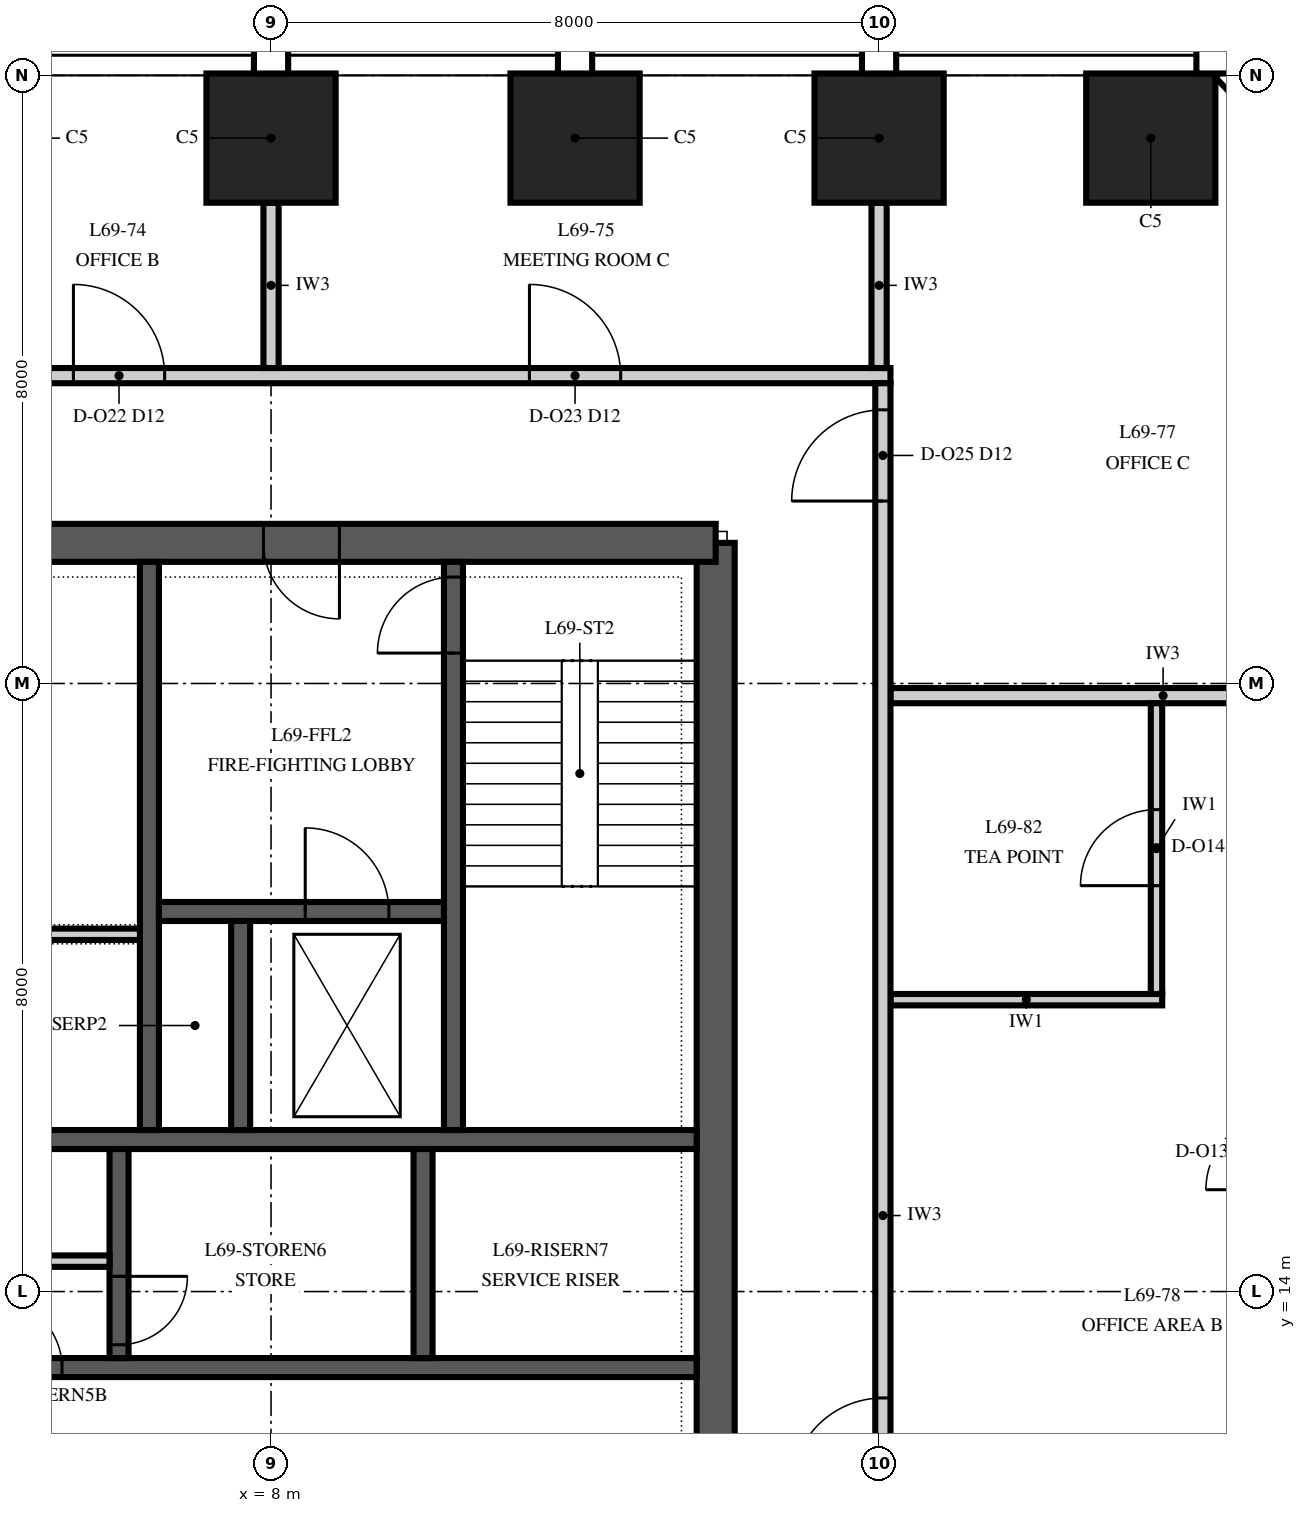
"""IFC4 building model, lengths in metres.
Left out: names, types, materials, properties, quantities, classifications, styles, units other than length and angle.
Written with IfcOpenShell. Run it as: python <this file> out.ifc"""

import sys

from ifc_helpers import new_model, si_unit, direction, frame, frame_2d, origin, origin_2d, place, context, subcontext, project, spatial, polyline, rectangle, outline, extrude, element, fill, save


model = new_model("IFC4")
c1 = context("Model", 3, precision=1e-05, world=origin(), true_north=direction((0.0, 1.0)))
c2 = subcontext(c1, "Body", "Model", "MODEL_VIEW")
j1 = project(units=[si_unit("LENGTHUNIT", "METRE"), si_unit("PLANEANGLEUNIT", "RADIAN")], contexts=[c1])
p1 = place(None, origin())
s1 = spatial("IfcSite", under=j1, at=p1, CompositionType="ELEMENT")
p2 = place(p1, origin())
s2 = spatial("IfcBuilding", under=s1, at=p2, CompositionType="ELEMENT")
p3 = place(p2, frame((0.0, 0.0, 296.0)))
s3 = spatial("IfcBuildingStorey", under=s2, at=p3, CompositionType="ELEMENT", Elevation=296.0)
for number, where, z_axis, x_axis in (
    (1, (19.575, 29.175, 0.0), (0.0, 0.0, 1.0), (-1.0, 0.0, 0.0)),
    (2, (16.0, 29.175, 0.0), (0.0, 0.0, 1.0), (-1.0, 0.0, 0.0)),
    (3, (12.0, 29.175, 0.0), (0.0, 0.0, 1.0), (-1.0, 0.0, 0.0)),
    (4, (8.0, 29.175, 0.0), (0.0, 0.0, 1.0), (-1.0, 0.0, 0.0)),
):
    element("IfcColumn", number, at=place(p3, frame(where, z_axis=z_axis, x_axis=x_axis)), inside=s3, PredefinedType="COLUMN", context=c2, shape_type="SweptSolid", body=[
        extrude(rectangle(XDim=1.7, YDim=1.7, at=origin_2d()), origin(), (0.0, 0.0, 1.0), 4.0),
    ])
p4 = place(p3, frame((13.85, 6.15, 0.0), z_axis=(0.0, 0.0, 1.0), x_axis=(0.0, 1.0, 0.0)))
e5 = element("IfcWall", 5, at=p4, inside=s3, PredefinedType="SHEAR", context=c2, shape_type="SweptSolid", body=[
    extrude(outline(polyline([(0.0, -0.25), (17.7, -0.25), (17.7, 0.0), (17.45, 0.0), (17.45, 0.25), (0.25, 0.25), (0.25, 0.0), (0.0, 0.0), (0.0, -0.25)])), origin(), (0.0, 0.0, 1.0), 4.0),
])
p5 = place(p4, frame((4.15, 0.0, 0.0)))
e6 = element("IfcOpeningElement", 6, at=p5, cuts=e5, PredefinedType="OPENING", context=c2, shape_type="SweptSolid", body=[
    extrude(rectangle(XDim=1.8, YDim=2.4, at=frame_2d((0.9, 1.2))), frame((0.0, 0.265, 0.0), z_axis=(0.0, -1.0, 0.0), x_axis=(1.0, 0.0, 0.0)), (0.0, 0.0, 1.0), 0.53),
])
p6 = place(p3, frame((13.85, 23.85, 0.0), z_axis=(0.0, 0.0, 1.0), x_axis=(-1.0, 0.0, 0.0)))
e7 = element("IfcWall", 7, at=p6, inside=s3, PredefinedType="SHEAR", context=c2, shape_type="SweptSolid", body=[
    extrude(rectangle(XDim=27.7, YDim=0.5, at=frame_2d((13.85, 0.0))), origin(), (0.0, 0.0, 1.0), 4.0),
])
p7 = place(p6, frame((21.75, 0.0, 0.0)))
e8 = element("IfcOpeningElement", 8, at=p7, cuts=e7, PredefinedType="OPENING", context=c2, shape_type="SweptSolid", body=[
    extrude(rectangle(XDim=1.0, YDim=2.1, at=frame_2d((0.5, 1.05))), frame((0.0, 0.265, 0.0), z_axis=(0.0, -1.0, 0.0), x_axis=(1.0, 0.0, 0.0)), (0.0, 0.0, 1.0), 0.53),
])
p8 = place(p6, frame((4.95, 0.0, 0.0)))
e9 = element("IfcOpeningElement", 9, at=p8, cuts=e7, PredefinedType="OPENING", context=c2, shape_type="SweptSolid", body=[
    extrude(rectangle(XDim=1.0, YDim=2.1, at=frame_2d((0.5, 1.05))), frame((0.0, 0.265, 0.0), z_axis=(0.0, -1.0, 0.0), x_axis=(1.0, 0.0, 0.0)), (0.0, 0.0, 1.0), 0.53),
])
p9 = place(p6, frame((17.35, 0.0, 0.0)))
e10 = element("IfcOpeningElement", 10, at=p9, cuts=e7, PredefinedType="OPENING", context=c2, shape_type="SweptSolid", body=[
    extrude(rectangle(XDim=1.0, YDim=2.1, at=frame_2d((0.5, 1.05))), frame((0.0, 0.265, 0.0), z_axis=(0.0, -1.0, 0.0), x_axis=(1.0, 0.0, 0.0)), (0.0, 0.0, 1.0), 0.53),
])
p10 = place(p6, frame((13.35, 0.0, 0.0)))
e11 = element("IfcOpeningElement", 11, at=p10, cuts=e7, PredefinedType="OPENING", context=c2, shape_type="SweptSolid", body=[
    extrude(rectangle(XDim=1.0, YDim=2.1, at=frame_2d((0.5, 1.05))), frame((0.0, 0.265, 0.0), z_axis=(0.0, -1.0, 0.0), x_axis=(1.0, 0.0, 0.0)), (0.0, 0.0, 1.0), 0.53),
])
p11 = place(p6, frame((9.35, 0.0, 0.0)))
e12 = element("IfcOpeningElement", 12, at=p11, cuts=e7, PredefinedType="OPENING", context=c2, shape_type="SweptSolid", body=[
    extrude(rectangle(XDim=1.0, YDim=2.1, at=frame_2d((0.5, 1.05))), frame((0.0, 0.265, 0.0), z_axis=(0.0, -1.0, 0.0), x_axis=(1.0, 0.0, 0.0)), (0.0, 0.0, 1.0), 0.53),
])
p12 = place(p3, frame((-13.6, 13.0, 0.0), z_axis=(0.0, 0.0, 1.0), x_axis=(1.0, 0.0, 0.0)))
e13 = element("IfcWall", 13, at=p12, inside=s3, PredefinedType="SHEAR", context=c2, shape_type="SweptSolid", body=[
    extrude(rectangle(XDim=27.2, YDim=0.25, at=frame_2d((13.6, 0.0))), origin(), (0.0, 0.0, 1.0), 4.0),
])
p13 = place(p12, frame((15.55, 0.0, 0.0)))
e14 = element("IfcOpeningElement", 14, at=p13, cuts=e13, PredefinedType="OPENING", context=c2, shape_type="SweptSolid", body=[
    extrude(rectangle(XDim=0.9, YDim=2.1, at=frame_2d((0.45, 1.05))), frame((0.0, 0.14, 0.0), z_axis=(0.0, -1.0, 0.0), x_axis=(1.0, 0.0, 0.0)), (0.0, 0.0, 1.0), 0.28),
])
p14 = place(p12, frame((17.95, 0.0, 0.0)))
e15 = element("IfcOpeningElement", 15, at=p14, cuts=e13, PredefinedType="OPENING", context=c2, shape_type="SweptSolid", body=[
    extrude(rectangle(XDim=0.9, YDim=2.1, at=frame_2d((0.45, 1.05))), frame((0.0, 0.14, 0.0), z_axis=(0.0, -1.0, 0.0), x_axis=(1.0, 0.0, 0.0)), (0.0, 0.0, 1.0), 0.28),
])
p15 = place(p12, frame((0.55, 0.0, 0.0)))
e16 = element("IfcOpeningElement", 16, at=p15, cuts=e13, PredefinedType="OPENING", context=c2, shape_type="SweptSolid", body=[
    extrude(rectangle(XDim=0.9, YDim=2.1, at=frame_2d((0.45, 1.05))), frame((0.0, 0.14, 0.0), z_axis=(0.0, -1.0, 0.0), x_axis=(1.0, 0.0, 0.0)), (0.0, 0.0, 1.0), 0.28),
])
p16 = place(p12, frame((3.35, 0.0, 0.0)))
e17 = element("IfcOpeningElement", 17, at=p16, cuts=e13, PredefinedType="OPENING", context=c2, shape_type="SweptSolid", body=[
    extrude(rectangle(XDim=0.9, YDim=2.1, at=frame_2d((0.45, 1.05))), frame((0.0, 0.14, 0.0), z_axis=(0.0, -1.0, 0.0), x_axis=(1.0, 0.0, 0.0)), (0.0, 0.0, 1.0), 0.28),
])
p17 = place(p12, frame((6.15, 0.0, 0.0)))
e18 = element("IfcOpeningElement", 18, at=p17, cuts=e13, PredefinedType="OPENING", context=c2, shape_type="SweptSolid", body=[
    extrude(rectangle(XDim=0.9, YDim=2.1, at=frame_2d((0.45, 1.05))), frame((0.0, 0.14, 0.0), z_axis=(0.0, -1.0, 0.0), x_axis=(1.0, 0.0, 0.0)), (0.0, 0.0, 1.0), 0.28),
])
p18 = place(p3, frame((-13.6, 16.0, 0.0), z_axis=(0.0, 0.0, 1.0), x_axis=(1.0, 0.0, 0.0)))
e19 = element("IfcWall", 19, at=p18, inside=s3, PredefinedType="SHEAR", context=c2, shape_type="SweptSolid", body=[
    extrude(rectangle(XDim=27.2, YDim=0.25, at=frame_2d((13.6, 0.0))), origin(), (0.0, 0.0, 1.0), 4.0),
])
p19 = place(p3, frame((6.0, 13.125, 0.0), z_axis=(0.0, 0.0, 1.0), x_axis=(0.0, 1.0, 0.0)))
e20 = element("IfcWall", 20, at=p19, inside=s3, PredefinedType="SHEAR", context=c2, shape_type="SweptSolid", body=[
    extrude(rectangle(XDim=2.75, YDim=0.25, at=frame_2d((1.375, 0.0))), origin(), (0.0, 0.0, 1.0), 4.0),
])
p20 = place(p19, frame((0.175, 0.0, 0.0)))
e21 = element("IfcOpeningElement", 21, at=p20, cuts=e20, PredefinedType="OPENING", context=c2, shape_type="SweptSolid", body=[
    extrude(rectangle(XDim=0.9, YDim=2.1, at=frame_2d((0.45, 1.05))), frame((0.0, 0.14, 0.0), z_axis=(0.0, -1.0, 0.0), x_axis=(1.0, 0.0, 0.0)), (0.0, 0.0, 1.0), 0.28),
])
p21 = place(p3, frame((10.0, 13.125, 0.0), z_axis=(0.0, 0.0, 1.0), x_axis=(0.0, 1.0, 0.0)))
e22 = element("IfcWall", 22, at=p21, inside=s3, PredefinedType="SHEAR", context=c2, shape_type="SweptSolid", body=[
    extrude(rectangle(XDim=2.75, YDim=0.25, at=frame_2d((1.375, 0.0))), origin(), (0.0, 0.0, 1.0), 4.0),
])
p22 = place(p3, frame((6.4, 16.125, 0.0), z_axis=(0.0, 0.0, 1.0), x_axis=(0.0, 1.0, 0.0)))
e23 = element("IfcWall", 23, at=p22, inside=s3, PredefinedType="SHEAR", context=c2, shape_type="SweptSolid", body=[
    extrude(rectangle(XDim=7.475, YDim=0.25, at=frame_2d((3.738, 0.0))), origin(), (0.0, 0.0, 1.0), 4.0),
])
p23 = place(p3, frame((10.4, 16.125, 0.0), z_axis=(0.0, 0.0, 1.0), x_axis=(0.0, 1.0, 0.0)))
e24 = element("IfcWall", 24, at=p23, inside=s3, PredefinedType="SHEAR", context=c2, shape_type="SweptSolid", body=[
    extrude(rectangle(XDim=7.475, YDim=0.25, at=frame_2d((3.738, 0.0))), origin(), (0.0, 0.0, 1.0), 4.0),
])
p24 = place(p23, frame((6.275, 0.0, 0.0)))
e25 = element("IfcOpeningElement", 25, at=p24, cuts=e24, PredefinedType="OPENING", context=c2, shape_type="SweptSolid", body=[
    extrude(rectangle(XDim=1.0, YDim=2.1, at=frame_2d((0.5, 1.05))), frame((0.0, 0.14, 0.0), z_axis=(0.0, -1.0, 0.0), x_axis=(1.0, 0.0, 0.0)), (0.0, 0.0, 1.0), 0.28),
])
p25 = place(p3, frame((6.525, 19.0, 0.0), z_axis=(0.0, 0.0, 1.0), x_axis=(1.0, 0.0, 0.0)))
e26 = element("IfcWall", 26, at=p25, inside=s3, PredefinedType="SHEAR", context=c2, shape_type="SweptSolid", body=[
    extrude(rectangle(XDim=3.75, YDim=0.25, at=frame_2d((1.875, 0.0))), origin(), (0.0, 0.0, 1.0), 4.0),
])
p26 = place(p25, frame((1.925, 0.0, 0.0)))
e27 = element("IfcOpeningElement", 27, at=p26, cuts=e26, PredefinedType="OPENING", context=c2, shape_type="SweptSolid", body=[
    extrude(rectangle(XDim=1.1, YDim=2.1, at=frame_2d((0.55, 1.05))), frame((0.0, 0.14, 0.0), z_axis=(0.0, -1.0, 0.0), x_axis=(1.0, 0.0, 0.0)), (0.0, 0.0, 1.0), 0.28),
])
p27 = place(p3, frame((7.6, 16.125, 0.0), z_axis=(0.0, 0.0, 1.0), x_axis=(0.0, 1.0, 0.0)))
e28 = element("IfcWall", 28, at=p27, inside=s3, PredefinedType="SHEAR", context=c2, shape_type="SweptSolid", body=[
    extrude(rectangle(XDim=2.75, YDim=0.25, at=frame_2d((1.375, 0.0))), origin(), (0.0, 0.0, 1.0), 4.0),
])
p28 = place(p3, frame((1.725, 18.7, 0.0), z_axis=(0.0, 0.0, 1.0), x_axis=(1.0, 0.0, 0.0)))
e29 = element("IfcWall", 29, at=p28, inside=s3, PredefinedType="PARTITIONING", context=c2, shape_type="SweptSolid", body=[
    extrude(rectangle(XDim=4.55, YDim=0.15, at=frame_2d((2.275, 0.0))), origin(), (0.0, 0.0, 1.0), 3.85),
])
p29 = place(p28, frame((1.825, 0.0, 0.0)))
e30 = element("IfcOpeningElement", 30, at=p29, cuts=e29, PredefinedType="OPENING", context=c2, shape_type="SweptSolid", body=[
    extrude(rectangle(XDim=0.9, YDim=2.1, at=frame_2d((0.45, 1.05))), frame((0.0, 0.09, 0.0), z_axis=(0.0, -1.0, 0.0), x_axis=(1.0, 0.0, 0.0)), (0.0, 0.0, 1.0), 0.18),
])
p30 = place(p3, frame((3.675, 14.4, 0.0), z_axis=(0.0, 0.0, 1.0), x_axis=(1.0, 0.0, 0.0)))
e31 = element("IfcWall", 31, at=p30, inside=s3, PredefinedType="PARTITIONING", context=c2, shape_type="SweptSolid", body=[
    extrude(rectangle(XDim=2.2, YDim=0.15, at=frame_2d((1.1, 0.0))), origin(), (0.0, 0.0, 1.0), 3.85),
])
p31 = place(p3, frame((16.15, 17.84, 0.0), z_axis=(0.0, 0.0, 1.0), x_axis=(1.0, 0.0, 0.0)))
e32 = element("IfcWall", 32, at=p31, inside=s3, PredefinedType="PARTITIONING", context=c2, shape_type="SweptSolid", body=[
    extrude(rectangle(XDim=3.575, YDim=0.15, at=frame_2d((1.788, 0.0))), origin(), (0.0, 0.0, 1.0), 3.23),
])
p32 = place(p3, frame((16.15, 21.84, 0.0), z_axis=(0.0, 0.0, 1.0), x_axis=(1.0, 0.0, 0.0)))
e33 = element("IfcWall", 33, at=p32, inside=s3, PredefinedType="PARTITIONING", context=c2, shape_type="SweptSolid", body=[
    extrude(rectangle(XDim=7.174, YDim=0.2, at=frame_2d((3.587, 0.0))), origin(), (0.0, 0.0, 1.0), 3.23),
])
p33 = place(p3, frame((-16.15, 26.05, 0.0), z_axis=(0.0, 0.0, 1.0), x_axis=(1.0, 0.0, 0.0)))
e34 = element("IfcWall", 34, at=p33, inside=s3, PredefinedType="PARTITIONING", context=c2, shape_type="SweptSolid", body=[
    extrude(rectangle(XDim=32.3, YDim=0.2, at=frame_2d((16.15, 0.0))), origin(), (0.0, 0.0, 1.0), 3.418),
])
p34 = place(p33, frame((3.55, 0.0, 0.0)))
e35 = element("IfcOpeningElement", 35, at=p34, cuts=e34, PredefinedType="OPENING", context=c2, shape_type="SweptSolid", body=[
    extrude(rectangle(XDim=1.2, YDim=2.4, at=frame_2d((0.6, 1.2))), frame((0.0, 0.115, 0.0), z_axis=(0.0, -1.0, 0.0), x_axis=(1.0, 0.0, 0.0)), (0.0, 0.0, 1.0), 0.23),
])
p35 = place(p33, frame((9.55, 0.0, 0.0)))
e36 = element("IfcOpeningElement", 36, at=p35, cuts=e34, PredefinedType="OPENING", context=c2, shape_type="SweptSolid", body=[
    extrude(rectangle(XDim=1.2, YDim=2.4, at=frame_2d((0.6, 1.2))), frame((0.0, 0.115, 0.0), z_axis=(0.0, -1.0, 0.0), x_axis=(1.0, 0.0, 0.0)), (0.0, 0.0, 1.0), 0.23),
])
p36 = place(p33, frame((15.55, 0.0, 0.0)))
e37 = element("IfcOpeningElement", 37, at=p36, cuts=e34, PredefinedType="OPENING", context=c2, shape_type="SweptSolid", body=[
    extrude(rectangle(XDim=1.2, YDim=2.4, at=frame_2d((0.6, 1.2))), frame((0.0, 0.115, 0.0), z_axis=(0.0, -1.0, 0.0), x_axis=(1.0, 0.0, 0.0)), (0.0, 0.0, 1.0), 0.23),
])
p37 = place(p33, frame((21.55, 0.0, 0.0)))
e38 = element("IfcOpeningElement", 38, at=p37, cuts=e34, PredefinedType="OPENING", context=c2, shape_type="SweptSolid", body=[
    extrude(rectangle(XDim=1.2, YDim=2.4, at=frame_2d((0.6, 1.2))), frame((0.0, 0.115, 0.0), z_axis=(0.0, -1.0, 0.0), x_axis=(1.0, 0.0, 0.0)), (0.0, 0.0, 1.0), 0.23),
])
p38 = place(p33, frame((27.55, 0.0, 0.0)))
e39 = element("IfcOpeningElement", 39, at=p38, cuts=e34, PredefinedType="OPENING", context=c2, shape_type="SweptSolid", body=[
    extrude(rectangle(XDim=1.2, YDim=2.4, at=frame_2d((0.6, 1.2))), frame((0.0, 0.115, 0.0), z_axis=(0.0, -1.0, 0.0), x_axis=(1.0, 0.0, 0.0)), (0.0, 0.0, 1.0), 0.23),
])
for number, where, z_axis, x_axis in (
    (40, (8.0, 26.15, 0.0), (0.0, 0.0, 1.0), (0.0, 1.0, 0.0)),
    (41, (16.0, 26.15, 0.0), (0.0, 0.0, 1.0), (0.0, 1.0, 0.0)),
):
    element("IfcWall", number, at=place(p3, frame(where, z_axis=z_axis, x_axis=x_axis)), inside=s3, PredefinedType="PARTITIONING", context=c2, shape_type="SweptSolid", body=[
        extrude(rectangle(XDim=2.175, YDim=0.2, at=frame_2d((1.087, 0.0))), origin(), (0.0, 0.0, 1.0), 3.418),
    ])
p39 = place(p3, frame((16.05, 4.05, 0.0), z_axis=(0.0, 0.0, 1.0), x_axis=(0.0, 1.0, 0.0)))
e42 = element("IfcWall", 42, at=p39, inside=s3, PredefinedType="PARTITIONING", context=c2, shape_type="SweptSolid", body=[
    extrude(rectangle(XDim=21.9, YDim=0.2, at=frame_2d((10.95, 0.0))), origin(), (0.0, 0.0, 1.0), 2.842),
])
p40 = place(p39, frame((0.25, 0.0, 0.0)))
e43 = element("IfcOpeningElement", 43, at=p40, cuts=e42, PredefinedType="OPENING", context=c2, shape_type="SweptSolid", body=[
    extrude(rectangle(XDim=1.2, YDim=2.4, at=frame_2d((0.6, 1.2))), frame((0.0, 0.115, 0.0), z_axis=(0.0, -1.0, 0.0), x_axis=(1.0, 0.0, 0.0)), (0.0, 0.0, 1.0), 0.23),
])
p41 = place(p39, frame((7.35, 0.0, 0.0)))
e44 = element("IfcOpeningElement", 44, at=p41, cuts=e42, PredefinedType="OPENING", context=c2, shape_type="SweptSolid", body=[
    extrude(rectangle(XDim=1.2, YDim=2.4, at=frame_2d((0.6, 1.2))), frame((0.0, 0.115, 0.0), z_axis=(0.0, -1.0, 0.0), x_axis=(1.0, 0.0, 0.0)), (0.0, 0.0, 1.0), 0.23),
])
p42 = place(p39, frame((20.35, 0.0, 0.0)))
e45 = element("IfcOpeningElement", 45, at=p42, cuts=e42, PredefinedType="OPENING", context=c2, shape_type="SweptSolid", body=[
    extrude(rectangle(XDim=1.2, YDim=2.4, at=frame_2d((0.6, 1.2))), frame((0.0, 0.115, 0.0), z_axis=(0.0, -1.0, 0.0), x_axis=(1.0, 0.0, 0.0)), (0.0, 0.0, 1.0), 0.23),
])
p43 = place(p3, frame((19.65, 17.915, 0.0), z_axis=(0.0, 0.0, 1.0), x_axis=(0.0, 1.0, 0.0)))
e46 = element("IfcWall", 46, at=p43, inside=s3, PredefinedType="PARTITIONING", context=c2, shape_type="SweptSolid", body=[
    extrude(rectangle(XDim=3.825, YDim=0.15, at=frame_2d((1.913, 0.0))), origin(), (0.0, 0.0, 1.0), 3.23),
])
p44 = place(p43, frame((1.425, 0.0, 0.0)))
e47 = element("IfcOpeningElement", 47, at=p44, cuts=e46, PredefinedType="OPENING", context=c2, shape_type="SweptSolid", body=[
    extrude(rectangle(XDim=1.0, YDim=2.3, at=frame_2d((0.5, 1.15))), frame((0.0, 0.09, 0.0), z_axis=(0.0, -1.0, 0.0), x_axis=(1.0, 0.0, 0.0)), (0.0, 0.0, 1.0), 0.18),
])
p45 = place(p8, origin())
e48 = element("IfcDoor", 48, at=p45, inside=s3, OperationType="SINGLE_SWING_RIGHT", PredefinedType="DOOR", context=c2, shape_type="SweptSolid", body=[
    extrude(rectangle(XDim=1.0, YDim=2.1, at=frame_2d((0.5, 1.05))), frame((0.0, 0.25, 0.0), z_axis=(0.0, -1.0, 0.0), x_axis=(1.0, 0.0, 0.0)), (0.0, 0.0, 1.0), 0.5),
])
fill(e9, e48)
p46 = place(p24, origin())
e49 = element("IfcDoor", 49, at=p46, inside=s3, OperationType="SINGLE_SWING_LEFT", PredefinedType="DOOR", context=c2, shape_type="SweptSolid", body=[
    extrude(rectangle(XDim=1.0, YDim=2.1, at=frame_2d((0.5, 1.05))), frame((0.0, 0.125, 0.0), z_axis=(0.0, -1.0, 0.0), x_axis=(1.0, 0.0, 0.0)), (0.0, 0.0, 1.0), 0.25),
])
fill(e25, e49)
p47 = place(p26, origin())
e50 = element("IfcDoor", 50, at=p47, inside=s3, OperationType="SLIDING_TO_RIGHT", PredefinedType="DOOR", context=c2, shape_type="SweptSolid", body=[
    extrude(rectangle(XDim=1.1, YDim=2.1, at=frame_2d((0.55, 1.05))), frame((0.0, 0.125, 0.0), z_axis=(0.0, -1.0, 0.0), x_axis=(1.0, 0.0, 0.0)), (0.0, 0.0, 1.0), 0.25),
])
fill(e27, e50)
p48 = place(p14, origin())
e51 = element("IfcDoor", 51, at=p48, inside=s3, OperationType="SINGLE_SWING_LEFT", PredefinedType="DOOR", context=c2, shape_type="SweptSolid", body=[
    extrude(rectangle(XDim=0.9, YDim=2.1, at=frame_2d((0.45, 1.05))), frame((0.0, 0.125, 0.0), z_axis=(0.0, -1.0, 0.0), x_axis=(1.0, 0.0, 0.0)), (0.0, 0.0, 1.0), 0.25),
])
fill(e15, e51)
p49 = place(p20, frame((0.9, 0.0, 0.0), z_axis=(0.0, 0.0, 1.0), x_axis=(-1.0, 0.0, 0.0)))
e52 = element("IfcDoor", 52, at=p49, inside=s3, OperationType="SINGLE_SWING_LEFT", PredefinedType="DOOR", context=c2, shape_type="SweptSolid", body=[
    extrude(rectangle(XDim=0.9, YDim=2.1, at=frame_2d((0.45, 1.05))), frame((0.0, 0.125, 0.0), z_axis=(0.0, -1.0, 0.0), x_axis=(1.0, 0.0, 0.0)), (0.0, 0.0, 1.0), 0.25),
])
fill(e21, e52)
p50 = place(p44, origin())
e53 = element("IfcDoor", 53, at=p50, inside=s3, OperationType="SINGLE_SWING_LEFT", PredefinedType="DOOR", context=c2, shape_type="SweptSolid", body=[
    extrude(rectangle(XDim=1.0, YDim=2.3, at=frame_2d((0.5, 1.15))), frame((0.0, 0.075, 0.0), z_axis=(0.0, -1.0, 0.0), x_axis=(1.0, 0.0, 0.0)), (0.0, 0.0, 1.0), 0.149),
])
fill(e47, e53)
p51 = place(p41, origin())
e54 = element("IfcDoor", 54, at=p51, inside=s3, OperationType="SINGLE_SWING_LEFT", PredefinedType="DOOR", context=c2, shape_type="SweptSolid", body=[
    extrude(rectangle(XDim=1.2, YDim=2.4, at=frame_2d((0.6, 1.2))), frame((0.0, 0.1, 0.0), z_axis=(0.0, -1.0, 0.0), x_axis=(1.0, 0.0, 0.0)), (0.0, 0.0, 1.0), 0.199),
])
fill(e44, e54)
p52 = place(p37, origin())
e55 = element("IfcDoor", 55, at=p52, inside=s3, OperationType="SINGLE_SWING_LEFT", PredefinedType="DOOR", context=c2, shape_type="SweptSolid", body=[
    extrude(rectangle(XDim=1.2, YDim=2.4, at=frame_2d((0.6, 1.2))), frame((0.0, 0.1, 0.0), z_axis=(0.0, -1.0, 0.0), x_axis=(1.0, 0.0, 0.0)), (0.0, 0.0, 1.0), 0.199),
])
fill(e38, e55)
p53 = place(p38, origin())
e56 = element("IfcDoor", 56, at=p53, inside=s3, OperationType="SINGLE_SWING_LEFT", PredefinedType="DOOR", context=c2, shape_type="SweptSolid", body=[
    extrude(rectangle(XDim=1.2, YDim=2.4, at=frame_2d((0.6, 1.2))), frame((0.0, 0.1, 0.0), z_axis=(0.0, -1.0, 0.0), x_axis=(1.0, 0.0, 0.0)), (0.0, 0.0, 1.0), 0.199),
])
fill(e39, e56)
p54 = place(p42, origin())
e57 = element("IfcDoor", 57, at=p54, inside=s3, OperationType="SINGLE_SWING_LEFT", PredefinedType="DOOR", context=c2, shape_type="SweptSolid", body=[
    extrude(rectangle(XDim=1.2, YDim=2.4, at=frame_2d((0.6, 1.2))), frame((0.0, 0.1, 0.0), z_axis=(0.0, -1.0, 0.0), x_axis=(1.0, 0.0, 0.0)), (0.0, 0.0, 1.0), 0.199),
])
fill(e45, e57)
save(model, sys.argv[1])
